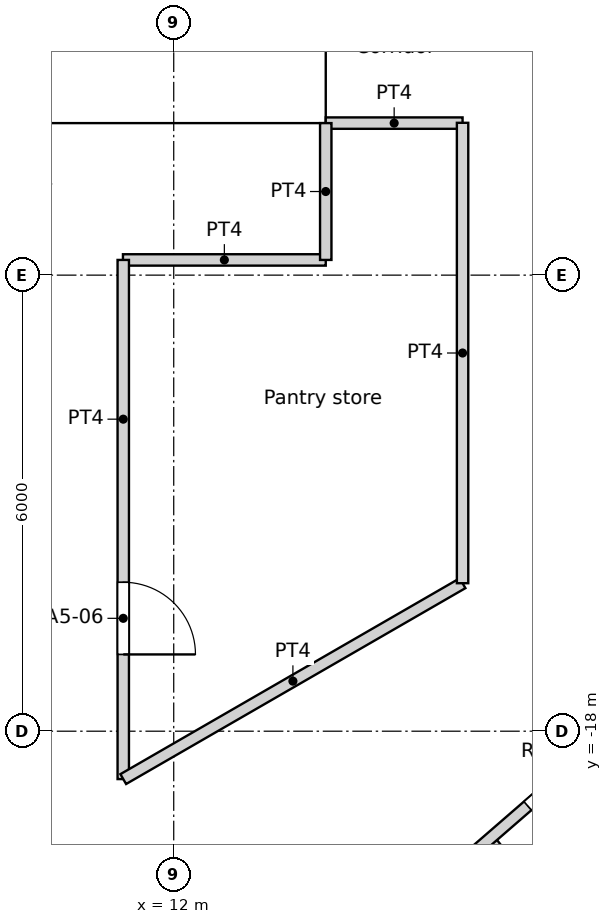
"""IFC4 building model, lengths in metres.
Left out: names, types, materials, properties, quantities, classifications, styles, units other than length and angle.
Written with IfcOpenShell. Run it as: python <this file> out.ifc"""

import sys

from ifc_helpers import new_model, si_unit, direction, frame, frame_2d, origin, origin_2d, place, context, subcontext, project, spatial, rectangle, circle, extrude, element, fill, save


model = new_model("IFC4")
c1 = context("Model", 3, precision=1e-05, world=origin(), true_north=direction((0.0, 1.0)))
c2 = subcontext(c1, "Body", "Model", "MODEL_VIEW")
j1 = project(units=[si_unit("LENGTHUNIT", "METRE"), si_unit("PLANEANGLEUNIT", "RADIAN")], contexts=[c1])
p1 = place(None, origin())
s1 = spatial("IfcSite", under=j1, at=p1, CompositionType="ELEMENT")
p2 = place(p1, origin())
s2 = spatial("IfcBuilding", under=s1, at=p2, CompositionType="ELEMENT")
p3 = place(p2, frame((0.0, 0.0, 71.4)))
s3 = spatial("IfcBuildingStorey", under=s2, at=p3, CompositionType="ELEMENT", Elevation=71.4)
p4 = place(p3, frame((14.659, -19.69, 0.0), z_axis=(0.0, 0.0, 1.0), x_axis=(1.0, 0.0, 0.0)))
e1 = element("IfcColumn", 1, at=p4, inside=s3, PredefinedType="COLUMN", context=c2, shape_type="SweptSolid", body=[
    extrude(circle(Radius=0.65, at=origin_2d()), origin(), (0.0, 0.0, 1.0), 3.6),
])
for number, where, z_axis, x_axis in (
    (2, (11.735, -14.716, 0.0), (0.0, 0.0, 1.0), (1.0, 0.0, 0.0)),
    (3, (15.552, -10.603, 0.0), (0.0, 0.0, 1.0), (1.0, 0.0, 0.0)),
):
    element("IfcColumn", number, at=place(p3, frame(where, z_axis=z_axis, x_axis=x_axis)), inside=s3, PredefinedType="COLUMN", context=c2, shape_type="SweptSolid", body=[
        extrude(circle(Radius=0.7, at=origin_2d()), origin(), (0.0, 0.0, 1.0), 3.6),
    ])
p5 = place(p3, frame((-14.0, -9.4, 0.0), z_axis=(0.0, 0.0, 1.0), x_axis=(1.0, 0.0, 0.0)))
e4 = element("IfcWall", 4, at=p5, inside=s3, PredefinedType="SOLIDWALL", context=c2, shape_type="SweptSolid", body=[
    extrude(rectangle(XDim=28.0, YDim=1.2, at=frame_2d((14.0, 0.0))), origin(), (0.0, 0.0, 1.0), 3.6),
])
p6 = place(p5, frame((14.9, 0.0, 0.0)))
e5 = element("IfcOpeningElement", 5, at=p6, cuts=e4, PredefinedType="OPENING", context=c2, shape_type="SweptSolid", body=[
    extrude(rectangle(XDim=1.0, YDim=2.1, at=frame_2d((0.5, 1.05))), frame((0.0, 0.6, 0.0), z_axis=(0.0, -1.0, 0.0), x_axis=(1.0, 0.0, 0.0)), (0.0, 0.0, 1.0), 1.2),
])
p7 = place(p5, frame((9.8, 0.0, 0.0)))
e6 = element("IfcOpeningElement", 6, at=p7, cuts=e4, PredefinedType="OPENING", context=c2, shape_type="SweptSolid", body=[
    extrude(rectangle(XDim=1.8, YDim=2.1, at=frame_2d((0.9, 1.05))), frame((0.0, 0.6, 0.0), z_axis=(0.0, -1.0, 0.0), x_axis=(1.0, 0.0, 0.0)), (0.0, 0.0, 1.0), 1.2),
])
p8 = place(p5, frame((16.4, 0.0, 0.0)))
e7 = element("IfcOpeningElement", 7, at=p8, cuts=e4, PredefinedType="OPENING", context=c2, shape_type="SweptSolid", body=[
    extrude(rectangle(XDim=1.8, YDim=2.1, at=frame_2d((0.9, 1.05))), frame((0.0, 0.6, 0.0), z_axis=(0.0, -1.0, 0.0), x_axis=(1.0, 0.0, 0.0)), (0.0, 0.0, 1.0), 1.2),
])
p9 = place(p3, frame((14.0, -11.8, 0.0), z_axis=(0.0, 0.0, 1.0), x_axis=(0.0, 1.0, 0.0)))
e8 = element("IfcWall", 8, at=p9, inside=s3, PredefinedType="PARTITIONING", context=c2, shape_type="SweptSolid", body=[
    extrude(rectangle(XDim=1.8, YDim=0.15, at=frame_2d((0.9, 0.0))), origin(), (0.0, 0.0, 1.0), 3.15),
])
p10 = place(p3, frame((11.332, -11.8, 0.0), z_axis=(0.0, 0.0, 1.0), x_axis=(1.0, 0.0, 0.0)))
e9 = element("IfcWall", 9, at=p10, inside=s3, PredefinedType="PARTITIONING", context=c2, shape_type="SweptSolid", body=[
    extrude(rectangle(XDim=2.668, YDim=0.15, at=frame_2d((1.334, 0.0))), origin(), (0.0, 0.0, 1.0), 3.15),
])
p11 = place(p3, frame((14.0, -10.0, 0.0), z_axis=(0.0, 0.0, 1.0), x_axis=(1.0, 0.0, 0.0)))
e10 = element("IfcWall", 10, at=p11, inside=s3, PredefinedType="PARTITIONING", context=c2, shape_type="SweptSolid", body=[
    extrude(rectangle(XDim=1.8, YDim=0.15, at=frame_2d((0.9, 0.0))), origin(), (0.0, 0.0, 1.0), 3.15),
])
p12 = place(p3, frame((15.8, -16.053, 0.0), z_axis=(0.0, 0.0, 1.0), x_axis=(0.0, 1.0, 0.0)))
e11 = element("IfcWall", 11, at=p12, inside=s3, PredefinedType="PARTITIONING", context=c2, shape_type="SweptSolid", body=[
    extrude(rectangle(XDim=6.057, YDim=0.15, at=frame_2d((3.028, 0.0))), origin(), (0.0, 0.0, 1.0), 3.15),
])
p13 = place(p3, frame((13.247, -21.939, 0.0), z_axis=(0.0, 0.0, 1.0), x_axis=(0.755420750547, 0.655240024451, 0.0)))
e12 = element("IfcWall", 12, at=p13, inside=s3, PredefinedType="PARTITIONING", context=c2, shape_type="SweptSolid", body=[
    extrude(rectangle(XDim=11.771, YDim=0.15, at=frame_2d((5.885, 0.0))), origin(), (0.0, 0.0, 1.0), 3.15),
])
p14 = place(p13, frame((4.513, 0.0, 0.0)))
e13 = element("IfcOpeningElement", 13, at=p14, cuts=e12, PredefinedType="OPENING", context=c2, shape_type="SweptSolid", body=[
    extrude(rectangle(XDim=1.0, YDim=2.1, at=frame_2d((0.5, 1.05))), frame((0.0, 0.075, 0.0), z_axis=(0.0, -1.0, 0.0), x_axis=(1.0, 0.0, 0.0)), (0.0, 0.0, 1.0), 0.15),
])
p15 = place(p13, frame((9.738, 0.0, 0.0)))
e14 = element("IfcOpeningElement", 14, at=p15, cuts=e12, PredefinedType="OPENING", context=c2, shape_type="SweptSolid", body=[
    extrude(rectangle(XDim=1.0, YDim=2.1, at=frame_2d((0.5, 1.05))), frame((0.0, 0.075, 0.0), z_axis=(0.0, -1.0, 0.0), x_axis=(1.0, 0.0, 0.0)), (0.0, 0.0, 1.0), 0.15),
])
p16 = place(p3, frame((11.336, -18.63, 0.0), z_axis=(0.0, 0.0, 1.0), x_axis=(0.0, 1.0, 0.0)))
e15 = element("IfcWall", 15, at=p16, inside=s3, PredefinedType="PARTITIONING", context=c2, shape_type="SweptSolid", body=[
    extrude(rectangle(XDim=6.83, YDim=0.15, at=frame_2d((3.415, 0.0))), origin(), (0.0, 0.0, 1.0), 3.15),
])
p17 = place(p16, frame((1.64, 0.0, 0.0)))
e16 = element("IfcOpeningElement", 16, at=p17, cuts=e15, PredefinedType="OPENING", context=c2, shape_type="SweptSolid", body=[
    extrude(rectangle(XDim=0.95, YDim=2.1, at=frame_2d((0.475, 1.05))), frame((0.0, 0.075, 0.0), z_axis=(0.0, -1.0, 0.0), x_axis=(1.0, 0.0, 0.0)), (0.0, 0.0, 1.0), 0.15),
])
p18 = place(p3, frame((11.336, -18.63, 0.0), z_axis=(0.0, 0.0, 1.0), x_axis=(0.866063337164, 0.499934291702, 0.0)))
e17 = element("IfcWall", 17, at=p18, inside=s3, PredefinedType="PARTITIONING", context=c2, shape_type="SweptSolid", body=[
    extrude(rectangle(XDim=5.155, YDim=0.15, at=frame_2d((2.577, 0.0))), origin(), (0.0, 0.0, 1.0), 3.15),
])
p19 = place(p3, frame((16.168, -19.404, 0.0), z_axis=(0.0, 0.0, 1.0), x_axis=(0.618142414415, -0.786066126672, 0.0)))
e18 = element("IfcWall", 18, at=p19, inside=s3, PredefinedType="PARTITIONING", context=c2, shape_type="SweptSolid", body=[
    extrude(rectangle(XDim=2.453, YDim=0.1, at=frame_2d((1.226, 0.0))), origin(), (0.0, 0.0, 1.0), 3.15),
])
p20 = place(p19, frame((0.777, 0.0, 0.0)))
e19 = element("IfcOpeningElement", 19, at=p20, cuts=e18, PredefinedType="OPENING", context=c2, shape_type="SweptSolid", body=[
    extrude(rectangle(XDim=0.9, YDim=2.04, at=frame_2d((0.45, 1.02))), frame((0.0, 0.05, 0.0), z_axis=(0.0, -1.0, 0.0), x_axis=(1.0, 0.0, 0.0)), (0.0, 0.0, 1.0), 0.1),
])
p21 = place(p17, origin())
e20 = element("IfcDoor", 20, at=p21, inside=s3, OperationType="SINGLE_SWING_RIGHT", PredefinedType="DOOR", context=c2, shape_type="SweptSolid", body=[
    extrude(rectangle(XDim=0.95, YDim=2.1, at=frame_2d((0.475, 1.05))), frame((0.0, 0.025, 0.0), z_axis=(0.0, -1.0, 0.0), x_axis=(1.0, 0.0, 0.0)), (0.0, 0.0, 1.0), 0.05),
])
fill(e16, e20)
p22 = place(p14, origin())
e21 = element("IfcDoor", 21, at=p22, inside=s3, OperationType="SINGLE_SWING_LEFT", PredefinedType="DOOR", context=c2, shape_type="SweptSolid", body=[
    extrude(rectangle(XDim=1.0, YDim=2.1, at=frame_2d((0.5, 1.05))), frame((0.0, 0.025, 0.0), z_axis=(0.0, -1.0, 0.0), x_axis=(1.0, 0.0, 0.0)), (0.0, 0.0, 1.0), 0.05),
])
fill(e13, e21)
save(model, sys.argv[1])
